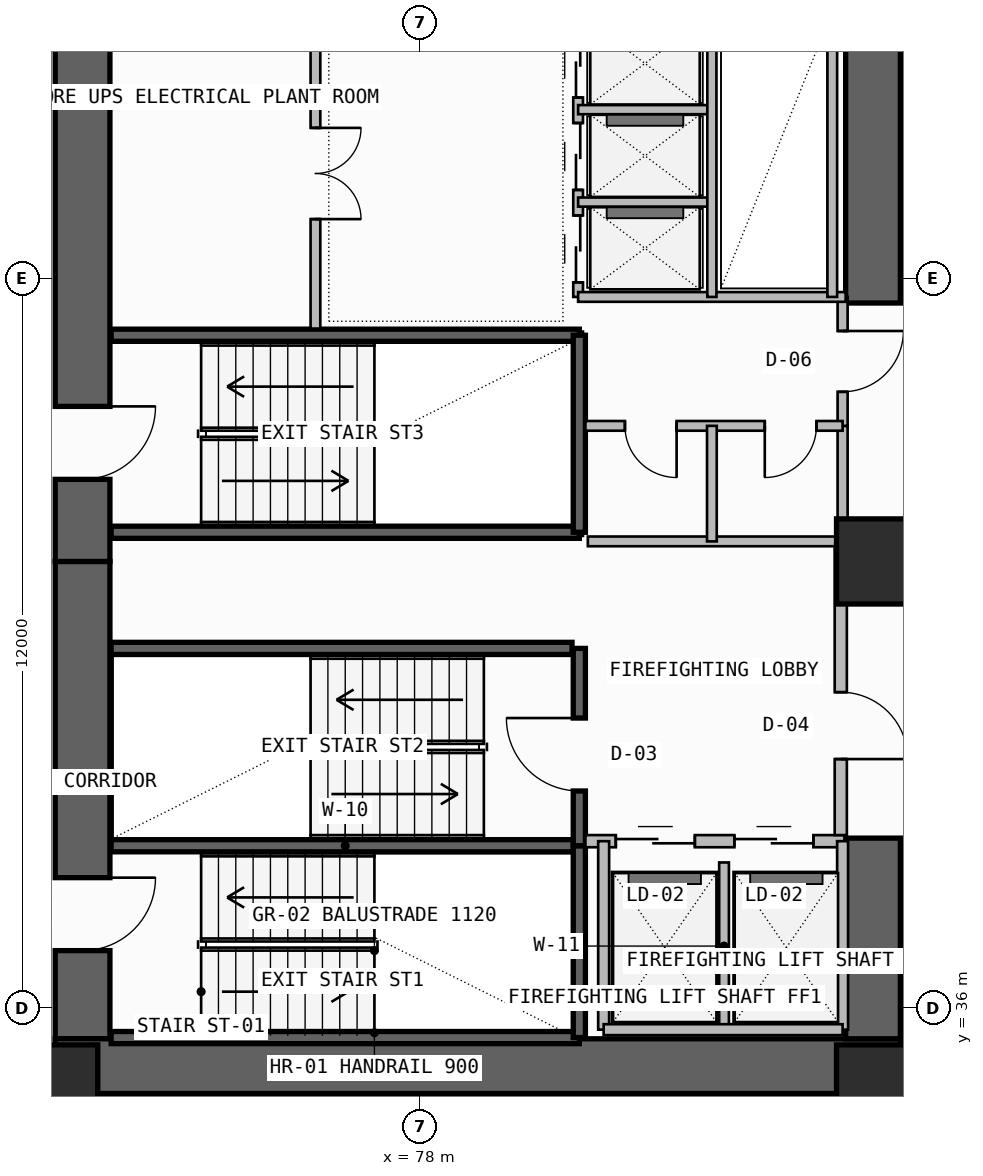
"""IFC4 building model, lengths in metres.
Left out: names, types, materials, properties, quantities, classifications, styles, units other than length and angle.
Written with IfcOpenShell. Run it as: python <this file> out.ifc"""

import sys

from ifc_helpers import new_model, si_unit, direction, frame, frame_2d, origin, origin_2d, place, context, subcontext, project, spatial, rectangle, extrude, element, fill, save


model = new_model("IFC4")
c1 = context("Model", 3, precision=1e-05, world=origin(), true_north=direction((0.0, 1.0)))
c2 = subcontext(c1, "Body", "Model", "MODEL_VIEW")
j1 = project(units=[si_unit("LENGTHUNIT", "METRE"), si_unit("PLANEANGLEUNIT", "RADIAN")], contexts=[c1])
p1 = place(None, origin())
s1 = spatial("IfcSite", under=j1, at=p1, CompositionType="ELEMENT")
p2 = place(p1, origin())
s2 = spatial("IfcBuilding", under=s1, at=p2, CompositionType="ELEMENT")
p3 = place(p2, frame((0.0, 0.0, 143.1)))
s3 = spatial("IfcBuildingStorey", under=s2, at=p3, CompositionType="ELEMENT", Elevation=143.1)
p4 = place(p3, frame((72.45, 35.5, -0.26), z_axis=(0.0, 0.0, 1.0), x_axis=(0.0, 1.0, 0.0)))
e1 = element("IfcWall", 1, at=p4, inside=s3, PredefinedType="SHEAR", context=c2, shape_type="SweptSolid", body=[
    extrude(rectangle(XDim=7.85, YDim=0.9, at=frame_2d((3.925, 0.0))), origin(), (0.0, 0.0, 1.0), 3.6),
])
p5 = place(p4, frame((1.45, 0.0, 0.26)))
e2 = element("IfcOpeningElement", 2, at=p5, cuts=e1, PredefinedType="OPENING", context=c2, shape_type="SweptSolid", body=[
    extrude(rectangle(XDim=1.2, YDim=2.2, at=frame_2d((0.6, 1.1))), frame((0.0, 0.46, 0.0), z_axis=(0.0, -1.0, 0.0), x_axis=(1.0, 0.0, 0.0)), (0.0, 0.0, 1.0), 0.92),
])
p6 = place(p3, frame((72.0, 35.05, -0.26), z_axis=(0.0, 0.0, 1.0), x_axis=(1.0, 0.0, 0.0)))
e3 = element("IfcWall", 3, at=p6, inside=s3, PredefinedType="SHEAR", context=c2, shape_type="SweptSolid", body=[
    extrude(rectangle(XDim=13.9, YDim=0.9, at=frame_2d((6.95, 0.0))), origin(), (0.0, 0.0, 1.0), 3.6),
])
p7 = place(p3, frame((85.45, 35.5, -0.26), z_axis=(0.0, 0.0, 1.0), x_axis=(0.0, 1.0, 0.0)))
e4 = element("IfcWall", 4, at=p7, inside=s3, PredefinedType="SHEAR", context=c2, shape_type="SweptSolid", body=[
    extrude(rectangle(XDim=3.3, YDim=0.9, at=frame_2d((1.65, 0.0))), origin(), (0.0, 0.0, 1.0), 3.6),
])
p8 = place(p3, frame((72.45, 43.35, -0.26), z_axis=(0.0, 0.0, 1.0), x_axis=(0.0, 1.0, 0.0)))
e5 = element("IfcWall", 5, at=p8, inside=s3, PredefinedType="SHEAR", context=c2, shape_type="SweptSolid", body=[
    extrude(rectangle(XDim=12.7, YDim=0.9, at=frame_2d((6.35, 0.0))), origin(), (0.0, 0.0, 1.0), 3.6),
])
p9 = place(p8, frame((1.35, 0.0, 0.26)))
e6 = element("IfcOpeningElement", 6, at=p9, cuts=e5, PredefinedType="OPENING", context=c2, shape_type="SweptSolid", body=[
    extrude(rectangle(XDim=1.2, YDim=2.2, at=frame_2d((0.6, 1.1))), frame((0.0, 0.46, 0.0), z_axis=(0.0, -1.0, 0.0), x_axis=(1.0, 0.0, 0.0)), (0.0, 0.0, 1.0), 0.92),
])
p10 = place(p3, frame((85.45, 47.6, -0.26), z_axis=(0.0, 0.0, 1.0), x_axis=(0.0, 1.0, 0.0)))
e7 = element("IfcWall", 7, at=p10, inside=s3, PredefinedType="SHEAR", context=c2, shape_type="SweptSolid", body=[
    extrude(rectangle(XDim=8.45, YDim=0.9, at=frame_2d((4.225, 0.0))), origin(), (0.0, 0.0, 1.0), 3.6),
])
for number, where, z_axis, x_axis in (
    (8, (72.0, 34.7, 0.0), (0.0, 0.0, 1.0), (1.0, 0.0, 0.0)),
    (9, (85.55, 34.7, 0.0), (0.0, 0.0, 1.0), (1.0, 0.0, 0.0)),
    (10, (85.55, 43.35, 0.0), (0.0, 0.0, 1.0), (1.0, 0.0, 0.0)),
):
    element("IfcColumn", number, at=place(p3, frame(where, z_axis=z_axis, x_axis=x_axis)), inside=s3, PredefinedType="COLUMN", context=c2, shape_type="SweptSolid", body=[
        extrude(rectangle(XDim=1.4, YDim=1.4, at=origin_2d()), origin(), (0.0, 0.0, 1.0), 3.6),
    ])
for number, where, z_axis, x_axis in (
    (11, (72.92, 35.52, -0.26), (0.0, 0.0, 1.0), (1.0, 0.0, 0.0)),
    (12, (72.92, 38.675, -0.26), (0.0, 0.0, 1.0), (1.0, 0.0, 0.0)),
):
    element("IfcWall", number, at=place(p3, frame(where, z_axis=z_axis, x_axis=x_axis)), inside=s3, PredefinedType="SOLIDWALL", context=c2, shape_type="SweptSolid", body=[
        extrude(rectangle(XDim=7.7, YDim=0.2, at=frame_2d((3.85, 0.0))), origin(), (0.0, 0.0, 1.0), 3.6),
    ])
p11 = place(p3, frame((80.62, 35.52, -0.26), z_axis=(0.0, 0.0, 1.0), x_axis=(0.0, 1.0, 0.0)))
e13 = element("IfcWall", 13, at=p11, inside=s3, PredefinedType="SOLIDWALL", context=c2, shape_type="SweptSolid", body=[
    extrude(rectangle(XDim=3.155, YDim=0.2, at=frame_2d((1.578, 0.0))), origin(), (0.0, 0.0, 1.0), 3.6),
])
p12 = place(p3, frame((80.62, 38.675, -0.26), z_axis=(0.0, 0.0, 1.0), x_axis=(0.0, 1.0, 0.0)))
e14 = element("IfcWall", 14, at=p12, inside=s3, PredefinedType="SOLIDWALL", context=c2, shape_type="SweptSolid", body=[
    extrude(rectangle(XDim=3.245, YDim=0.2, at=frame_2d((1.623, 0.0))), origin(), (0.0, 0.0, 1.0), 3.6),
])
p13 = place(p12, frame((0.9, 0.0, 0.26)))
e15 = element("IfcOpeningElement", 15, at=p13, cuts=e14, PredefinedType="OPENING", context=c2, shape_type="SweptSolid", body=[
    extrude(rectangle(XDim=1.2, YDim=2.2, at=frame_2d((0.6, 1.1))), frame((0.0, 0.11, 0.0), z_axis=(0.0, -1.0, 0.0), x_axis=(1.0, 0.0, 0.0)), (0.0, 0.0, 1.0), 0.22),
])
p14 = place(p3, frame((80.72, 38.75, 0.0), z_axis=(0.0, 0.0, 1.0), x_axis=(1.0, 0.0, 0.0)))
e16 = element("IfcWall", 16, at=p14, inside=s3, PredefinedType="SOLIDWALL", context=c2, shape_type="SweptSolid", body=[
    extrude(rectangle(XDim=4.26, YDim=0.2, at=frame_2d((2.13, 0.0))), origin(), (0.0, 0.0, 1.0), 3.34),
])
p15 = place(p14, frame((0.5, 0.0, 0.0)))
e17 = element("IfcOpeningElement", 17, at=p15, cuts=e16, PredefinedType="OPENING", context=c2, shape_type="SweptSolid", body=[
    extrude(rectangle(XDim=1.3, YDim=2.3, at=frame_2d((0.65, 1.15))), frame((0.0, 0.11, 0.0), z_axis=(0.0, -1.0, 0.0), x_axis=(1.0, 0.0, 0.0)), (0.0, 0.0, 1.0), 0.22),
])
p16 = place(p14, frame((2.45, 0.0, 0.0)))
e18 = element("IfcOpeningElement", 18, at=p16, cuts=e16, PredefinedType="OPENING", context=c2, shape_type="SweptSolid", body=[
    extrude(rectangle(XDim=1.3, YDim=2.3, at=frame_2d((0.65, 1.15))), frame((0.0, 0.11, 0.0), z_axis=(0.0, -1.0, 0.0), x_axis=(1.0, 0.0, 0.0)), (0.0, 0.0, 1.0), 0.22),
])
p17 = place(p3, frame((83.0, 35.65, 0.0), z_axis=(0.0, 0.0, 1.0), x_axis=(0.0, 1.0, 0.0)))
e19 = element("IfcWall", 19, at=p17, inside=s3, PredefinedType="PLUMBINGWALL", context=c2, shape_type="SweptSolid", body=[
    extrude(rectangle(XDim=2.75, YDim=0.16, at=frame_2d((1.375, 0.0))), origin(), (0.0, 0.0, 1.0), 3.34),
])
for number, where, z_axis, x_axis in (
    (20, (84.95, 35.65, 0.0), (0.0, 0.0, 1.0), (0.0, 1.0, 0.0)),
    (21, (81.02, 35.65, 0.0), (0.0, 0.0, 1.0), (0.0, 1.0, 0.0)),
):
    element("IfcWall", number, at=place(p3, frame(where, z_axis=z_axis, x_axis=x_axis)), inside=s3, PredefinedType="SOLIDWALL", context=c2, shape_type="SweptSolid", body=[
        extrude(rectangle(XDim=3.1, YDim=0.18, at=frame_2d((1.55, 0.0))), origin(), (0.0, 0.0, 1.0), 3.34),
    ])
p18 = place(p3, frame((81.02, 35.65, 0.0), z_axis=(0.0, 0.0, 1.0), x_axis=(1.0, 0.0, 0.0)))
e22 = element("IfcWall", 22, at=p18, inside=s3, PredefinedType="SOLIDWALL", context=c2, shape_type="SweptSolid", body=[
    extrude(rectangle(XDim=3.93, YDim=0.18, at=frame_2d((1.965, 0.0))), origin(), (0.0, 0.0, 1.0), 3.34),
])
p19 = place(p3, frame((84.92, 38.85, 0.0), z_axis=(0.0, 0.0, 1.0), x_axis=(0.0, 1.0, 0.0)))
e23 = element("IfcWall", 23, at=p19, inside=s3, PredefinedType="SOLIDWALL", context=c2, shape_type="SweptSolid", body=[
    extrude(rectangle(XDim=4.83, YDim=0.2, at=frame_2d((2.415, 0.0))), origin(), (0.0, 0.0, 1.0), 3.34),
])
p20 = place(p19, frame((1.25, 0.0, 0.0)))
e24 = element("IfcOpeningElement", 24, at=p20, cuts=e23, PredefinedType="OPENING", context=c2, shape_type="SweptSolid", body=[
    extrude(rectangle(XDim=1.1, YDim=2.2, at=frame_2d((0.55, 1.1))), frame((0.0, 0.11, 0.0), z_axis=(0.0, -1.0, 0.0), x_axis=(1.0, 0.0, 0.0)), (0.0, 0.0, 1.0), 0.22),
])
p21 = place(p3, frame((72.92, 41.92, -0.26), z_axis=(0.0, 0.0, 1.0), x_axis=(1.0, 0.0, 0.0)))
e25 = element("IfcWall", 25, at=p21, inside=s3, PredefinedType="SOLIDWALL", context=c2, shape_type="SweptSolid", body=[
    extrude(rectangle(XDim=7.58, YDim=0.2, at=frame_2d((3.79, 0.0))), origin(), (0.0, 0.0, 1.0), 3.6),
])
for number, where, z_axis, x_axis in (
    (26, (72.92, 43.83, -0.26), (0.0, 0.0, 1.0), (1.0, 0.0, 0.0)),
    (27, (72.92, 47.07, -0.26), (0.0, 0.0, 1.0), (1.0, 0.0, 0.0)),
):
    element("IfcWall", number, at=place(p3, frame(where, z_axis=z_axis, x_axis=x_axis)), inside=s3, PredefinedType="SOLIDWALL", context=c2, shape_type="SweptSolid", body=[
        extrude(rectangle(XDim=7.7, YDim=0.2, at=frame_2d((3.85, 0.0))), origin(), (0.0, 0.0, 1.0), 3.6),
    ])
p22 = place(p3, frame((80.62, 43.83, -0.26), z_axis=(0.0, 0.0, 1.0), x_axis=(0.0, 1.0, 0.0)))
e28 = element("IfcWall", 28, at=p22, inside=s3, PredefinedType="SOLIDWALL", context=c2, shape_type="SweptSolid", body=[
    extrude(rectangle(XDim=3.24, YDim=0.2, at=frame_2d((1.62, 0.0))), origin(), (0.0, 0.0, 1.0), 3.6),
])
p23 = place(p3, frame((84.95, 43.68, 0.0), z_axis=(0.0, 0.0, 1.0), x_axis=(0.0, 1.0, 0.0)))
e29 = element("IfcWall", 29, at=p23, inside=s3, PredefinedType="PLUMBINGWALL", context=c2, shape_type="SweptSolid", body=[
    extrude(rectangle(XDim=1.9, YDim=0.165, at=frame_2d((0.95, 0.0))), origin(), (0.0, 0.0, 1.0), 3.34),
])
p24 = place(p3, frame((84.95, 45.58, 0.0), z_axis=(0.0, 0.0, 1.0), x_axis=(0.0, 1.0, 0.0)))
e30 = element("IfcWall", 30, at=p24, inside=s3, PredefinedType="PARTITIONING", context=c2, shape_type="SweptSolid", body=[
    extrude(rectangle(XDim=2.12, YDim=0.165, at=frame_2d((1.06, 0.0))), origin(), (0.0, 0.0, 1.0), 3.34),
])
p25 = place(p24, frame((0.56, 0.0, 0.0)))
e31 = element("IfcOpeningElement", 31, at=p25, cuts=e30, PredefinedType="OPENING", context=c2, shape_type="SweptSolid", body=[
    extrude(rectangle(XDim=1.0, YDim=2.2, at=frame_2d((0.5, 1.1))), frame((0.0, 0.093, 0.0), z_axis=(0.0, -1.0, 0.0), x_axis=(1.0, 0.0, 0.0)), (0.0, 0.0, 1.0), 0.185),
])
p26 = place(p3, frame((80.72, 45.58, 0.0), z_axis=(0.0, 0.0, 1.0), x_axis=(1.0, 0.0, 0.0)))
e32 = element("IfcWall", 32, at=p26, inside=s3, PredefinedType="PLUMBINGWALL", context=c2, shape_type="SweptSolid", body=[
    extrude(rectangle(XDim=4.23, YDim=0.16, at=frame_2d((2.115, 0.0))), origin(), (0.0, 0.0, 1.0), 3.34),
])
p27 = place(p26, frame((0.65, 0.0, 0.0)))
e33 = element("IfcOpeningElement", 33, at=p27, cuts=e32, PredefinedType="OPENING", context=c2, shape_type="SweptSolid", body=[
    extrude(rectangle(XDim=0.85, YDim=2.05, at=frame_2d((0.425, 1.025))), frame((0.0, 0.09, 0.0), z_axis=(0.0, -1.0, 0.0), x_axis=(1.0, 0.0, 0.0)), (0.0, 0.0, 1.0), 0.18),
])
p28 = place(p26, frame((2.95, 0.0, 0.0)))
e34 = element("IfcOpeningElement", 34, at=p28, cuts=e32, PredefinedType="OPENING", context=c2, shape_type="SweptSolid", body=[
    extrude(rectangle(XDim=0.85, YDim=2.05, at=frame_2d((0.425, 1.025))), frame((0.0, 0.09, 0.0), z_axis=(0.0, -1.0, 0.0), x_axis=(1.0, 0.0, 0.0)), (0.0, 0.0, 1.0), 0.18),
])
p29 = place(p3, frame((80.76, 43.68, 0.0), z_axis=(0.0, 0.0, 1.0), x_axis=(1.0, 0.0, 0.0)))
e35 = element("IfcWall", 35, at=p29, inside=s3, PredefinedType="PLUMBINGWALL", context=c2, shape_type="SweptSolid", body=[
    extrude(rectangle(XDim=4.19, YDim=0.16, at=frame_2d((2.095, 0.0))), origin(), (0.0, 0.0, 1.0), 3.34),
])
p30 = place(p3, frame((82.8, 43.68, 0.0), z_axis=(0.0, 0.0, 1.0), x_axis=(0.0, 1.0, 0.0)))
e36 = element("IfcWall", 36, at=p30, inside=s3, PredefinedType="PLUMBINGWALL", context=c2, shape_type="SweptSolid", body=[
    extrude(rectangle(XDim=1.9, YDim=0.16, at=frame_2d((0.95, 0.0))), origin(), (0.0, 0.0, 1.0), 3.34),
])
p31 = place(p3, frame((76.28, 47.18, 0.0), z_axis=(0.0, 0.0, 1.0), x_axis=(0.0, 1.0, 0.0)))
e37 = element("IfcWall", 37, at=p31, inside=s3, PredefinedType="SOLIDWALL", context=c2, shape_type="SweptSolid", body=[
    extrude(rectangle(XDim=5.14, YDim=0.16, at=frame_2d((2.57, 0.0))), origin(), (0.0, 0.0, 1.0), 3.34),
])
p32 = place(p31, frame((1.8, 0.0, 0.0)))
e38 = element("IfcOpeningElement", 38, at=p32, cuts=e37, PredefinedType="OPENING", context=c2, shape_type="SweptSolid", body=[
    extrude(rectangle(XDim=1.5, YDim=2.25, at=frame_2d((0.75, 1.125))), frame((0.0, 0.09, 0.0), z_axis=(0.0, -1.0, 0.0), x_axis=(1.0, 0.0, 0.0)), (0.0, 0.0, 1.0), 0.18),
])
p33 = place(p3, frame((80.6, 47.7, 0.0), z_axis=(0.0, 0.0, 1.0), x_axis=(0.0, 1.0, 0.0)))
e39 = element("IfcWall", 39, at=p33, inside=s3, PredefinedType="SOLIDWALL", context=c2, shape_type="SweptSolid", body=[
    extrude(rectangle(XDim=4.6, YDim=0.16, at=frame_2d((2.3, 0.0))), origin(), (0.0, 0.0, 1.0), 3.34),
])
p34 = place(p33, frame((0.24, 0.0, 0.0)))
e40 = element("IfcOpeningElement", 40, at=p34, cuts=e39, PredefinedType="OPENING", context=c2, shape_type="SweptSolid", body=[
    extrude(rectangle(XDim=1.1, YDim=2.25, at=frame_2d((0.55, 1.125))), frame((0.0, 0.09, 0.0), z_axis=(0.0, -1.0, 0.0), x_axis=(1.0, 0.0, 0.0)), (0.0, 0.0, 1.0), 0.18),
])
p35 = place(p33, frame((1.76, 0.0, 0.0)))
e41 = element("IfcOpeningElement", 41, at=p35, cuts=e39, PredefinedType="OPENING", context=c2, shape_type="SweptSolid", body=[
    extrude(rectangle(XDim=1.1, YDim=2.25, at=frame_2d((0.55, 1.125))), frame((0.0, 0.09, 0.0), z_axis=(0.0, -1.0, 0.0), x_axis=(1.0, 0.0, 0.0)), (0.0, 0.0, 1.0), 0.18),
])
p36 = place(p33, frame((3.28, 0.0, 0.0)))
e42 = element("IfcOpeningElement", 42, at=p36, cuts=e39, PredefinedType="OPENING", context=c2, shape_type="SweptSolid", body=[
    extrude(rectangle(XDim=1.1, YDim=2.25, at=frame_2d((0.55, 1.125))), frame((0.0, 0.09, 0.0), z_axis=(0.0, -1.0, 0.0), x_axis=(1.0, 0.0, 0.0)), (0.0, 0.0, 1.0), 0.18),
])
p37 = place(p3, frame((80.6, 47.7, 0.0), z_axis=(0.0, 0.0, 1.0), x_axis=(1.0, 0.0, 0.0)))
e43 = element("IfcWall", 43, at=p37, inside=s3, PredefinedType="SOLIDWALL", context=c2, shape_type="SweptSolid", body=[
    extrude(rectangle(XDim=4.4, YDim=0.16, at=frame_2d((2.2, 0.0))), origin(), (0.0, 0.0, 1.0), 3.34),
])
for number, where, z_axis, x_axis in (
    (44, (80.6, 49.26, 0.0), (0.0, 0.0, 1.0), (1.0, 0.0, 0.0)),
    (45, (80.6, 50.78, 0.0), (0.0, 0.0, 1.0), (1.0, 0.0, 0.0)),
):
    element("IfcWall", number, at=place(p3, frame(where, z_axis=z_axis, x_axis=x_axis)), inside=s3, PredefinedType="PLUMBINGWALL", context=c2, shape_type="SweptSolid", body=[
        extrude(rectangle(XDim=2.2, YDim=0.15, at=frame_2d((1.1, 0.0))), origin(), (0.0, 0.0, 1.0), 3.34),
    ])
p38 = place(p3, frame((82.8, 47.7, 0.0), z_axis=(0.0, 0.0, 1.0), x_axis=(0.0, 1.0, 0.0)))
e46 = element("IfcWall", 46, at=p38, inside=s3, PredefinedType="PLUMBINGWALL", context=c2, shape_type="SweptSolid", body=[
    extrude(rectangle(XDim=4.6, YDim=0.15, at=frame_2d((2.3, 0.0))), origin(), (0.0, 0.0, 1.0), 3.34),
])
p39 = place(p3, frame((84.78, 47.7, 0.0), z_axis=(0.0, 0.0, 1.0), x_axis=(0.0, 1.0, 0.0)))
e47 = element("IfcWall", 47, at=p39, inside=s3, PredefinedType="SOLIDWALL", context=c2, shape_type="SweptSolid", body=[
    extrude(rectangle(XDim=4.6, YDim=0.16, at=frame_2d((2.3, 0.0))), origin(), (0.0, 0.0, 1.0), 3.34),
])
p40 = place(p5, frame((1.2, 0.0, 0.0), z_axis=(0.0, 0.0, 1.0), x_axis=(-1.0, 0.0, 0.0)))
e48 = element("IfcDoor", 48, at=p40, inside=s3, OperationType="SINGLE_SWING_LEFT", PredefinedType="USERDEFINED", context=c2, shape_type="SweptSolid", body=[
    extrude(rectangle(XDim=1.2, YDim=2.2, at=frame_2d((0.6, 1.1))), frame((0.0, 0.025, 0.0), z_axis=(0.0, -1.0, 0.0), x_axis=(1.0, 0.0, 0.0)), (0.0, 0.0, 1.0), 0.05),
])
fill(e2, e48)
p41 = place(p13, origin())
e49 = element("IfcDoor", 49, at=p41, inside=s3, OperationType="SINGLE_SWING_RIGHT", PredefinedType="USERDEFINED", context=c2, shape_type="SweptSolid", body=[
    extrude(rectangle(XDim=1.2, YDim=2.2, at=frame_2d((0.6, 1.1))), frame((0.0, 0.025, 0.0), z_axis=(0.0, -1.0, 0.0), x_axis=(1.0, 0.0, 0.0)), (0.0, 0.0, 1.0), 0.05),
])
fill(e15, e49)
p42 = place(p15, origin())
e50 = element("IfcDoor", 50, at=p42, inside=s3, OperationType="DOUBLE_DOOR_SLIDING", PredefinedType="DOOR", context=c2, shape_type="SweptSolid", body=[
    extrude(rectangle(XDim=1.3, YDim=2.3, at=frame_2d((0.65, 1.15))), frame((0.0, 0.025, 0.0), z_axis=(0.0, -1.0, 0.0), x_axis=(1.0, 0.0, 0.0)), (0.0, 0.0, 1.0), 0.05),
])
fill(e17, e50)
p43 = place(p16, origin())
e51 = element("IfcDoor", 51, at=p43, inside=s3, OperationType="DOUBLE_DOOR_SLIDING", PredefinedType="DOOR", context=c2, shape_type="SweptSolid", body=[
    extrude(rectangle(XDim=1.3, YDim=2.3, at=frame_2d((0.65, 1.15))), frame((0.0, 0.025, 0.0), z_axis=(0.0, -1.0, 0.0), x_axis=(1.0, 0.0, 0.0)), (0.0, 0.0, 1.0), 0.05),
])
fill(e18, e51)
p44 = place(p20, frame((1.1, 0.0, 0.0), z_axis=(0.0, 0.0, 1.0), x_axis=(-1.0, 0.0, 0.0)))
e52 = element("IfcDoor", 52, at=p44, inside=s3, OperationType="SINGLE_SWING_RIGHT", PredefinedType="DOOR", context=c2, shape_type="SweptSolid", body=[
    extrude(rectangle(XDim=1.1, YDim=2.2, at=frame_2d((0.55, 1.1))), frame((0.0, 0.025, 0.0), z_axis=(0.0, -1.0, 0.0), x_axis=(1.0, 0.0, 0.0)), (0.0, 0.0, 1.0), 0.05),
])
fill(e24, e52)
p45 = place(p9, frame((1.2, 0.0, 0.0), z_axis=(0.0, 0.0, 1.0), x_axis=(-1.0, 0.0, 0.0)))
e53 = element("IfcDoor", 53, at=p45, inside=s3, OperationType="SINGLE_SWING_LEFT", PredefinedType="USERDEFINED", context=c2, shape_type="SweptSolid", body=[
    extrude(rectangle(XDim=1.2, YDim=2.2, at=frame_2d((0.6, 1.1))), frame((0.0, 0.025, 0.0), z_axis=(0.0, -1.0, 0.0), x_axis=(1.0, 0.0, 0.0)), (0.0, 0.0, 1.0), 0.05),
])
fill(e6, e53)
p46 = place(p25, frame((1.0, 0.0, 0.0), z_axis=(0.0, 0.0, 1.0), x_axis=(-1.0, 0.0, 0.0)))
e54 = element("IfcDoor", 54, at=p46, inside=s3, OperationType="SINGLE_SWING_LEFT", PredefinedType="DOOR", context=c2, shape_type="SweptSolid", body=[
    extrude(rectangle(XDim=1.0, YDim=2.2, at=frame_2d((0.5, 1.1))), frame((0.0, 0.025, 0.0), z_axis=(0.0, -1.0, 0.0), x_axis=(1.0, 0.0, 0.0)), (0.0, 0.0, 1.0), 0.05),
])
fill(e31, e54)
p47 = place(p27, frame((0.85, 0.0, 0.0), z_axis=(0.0, 0.0, 1.0), x_axis=(-1.0, 0.0, 0.0)))
e55 = element("IfcDoor", 55, at=p47, inside=s3, OperationType="SINGLE_SWING_LEFT", PredefinedType="DOOR", context=c2, shape_type="SweptSolid", body=[
    extrude(rectangle(XDim=0.85, YDim=2.05, at=frame_2d((0.425, 1.025))), frame((0.0, 0.025, 0.0), z_axis=(0.0, -1.0, 0.0), x_axis=(1.0, 0.0, 0.0)), (0.0, 0.0, 1.0), 0.05),
])
fill(e33, e55)
p48 = place(p28, frame((0.85, 0.0, 0.0), z_axis=(0.0, 0.0, 1.0), x_axis=(-1.0, 0.0, 0.0)))
e56 = element("IfcDoor", 56, at=p48, inside=s3, OperationType="SINGLE_SWING_RIGHT", PredefinedType="DOOR", context=c2, shape_type="SweptSolid", body=[
    extrude(rectangle(XDim=0.85, YDim=2.05, at=frame_2d((0.425, 1.025))), frame((0.0, 0.025, 0.0), z_axis=(0.0, -1.0, 0.0), x_axis=(1.0, 0.0, 0.0)), (0.0, 0.0, 1.0), 0.05),
])
fill(e34, e56)
p49 = place(p32, frame((1.5, 0.0, 0.0), z_axis=(0.0, 0.0, 1.0), x_axis=(-1.0, 0.0, 0.0)))
e57 = element("IfcDoor", 57, at=p49, inside=s3, OperationType="DOUBLE_DOOR_SINGLE_SWING", PredefinedType="DOOR", context=c2, shape_type="SweptSolid", body=[
    extrude(rectangle(XDim=1.5, YDim=2.25, at=frame_2d((0.75, 1.125))), frame((0.0, 0.025, 0.0), z_axis=(0.0, -1.0, 0.0), x_axis=(1.0, 0.0, 0.0)), (0.0, 0.0, 1.0), 0.05),
])
fill(e38, e57)
p50 = place(p34, frame((1.1, 0.0, 0.0), z_axis=(0.0, 0.0, 1.0), x_axis=(-1.0, 0.0, 0.0)))
e58 = element("IfcDoor", 58, at=p50, inside=s3, OperationType="DOUBLE_DOOR_SLIDING", PredefinedType="DOOR", context=c2, shape_type="SweptSolid", body=[
    extrude(rectangle(XDim=1.1, YDim=2.25, at=frame_2d((0.55, 1.125))), frame((0.0, 0.025, 0.0), z_axis=(0.0, -1.0, 0.0), x_axis=(1.0, 0.0, 0.0)), (0.0, 0.0, 1.0), 0.05),
])
fill(e40, e58)
p51 = place(p35, frame((1.1, 0.0, 0.0), z_axis=(0.0, 0.0, 1.0), x_axis=(-1.0, 0.0, 0.0)))
e59 = element("IfcDoor", 59, at=p51, inside=s3, OperationType="DOUBLE_DOOR_SLIDING", PredefinedType="DOOR", context=c2, shape_type="SweptSolid", body=[
    extrude(rectangle(XDim=1.1, YDim=2.25, at=frame_2d((0.55, 1.125))), frame((0.0, 0.025, 0.0), z_axis=(0.0, -1.0, 0.0), x_axis=(1.0, 0.0, 0.0)), (0.0, 0.0, 1.0), 0.05),
])
fill(e41, e59)
p52 = place(p36, frame((1.1, 0.0, 0.0), z_axis=(0.0, 0.0, 1.0), x_axis=(-1.0, 0.0, 0.0)))
e60 = element("IfcDoor", 60, at=p52, inside=s3, OperationType="DOUBLE_DOOR_SLIDING", PredefinedType="DOOR", context=c2, shape_type="SweptSolid", body=[
    extrude(rectangle(XDim=1.1, YDim=2.25, at=frame_2d((0.55, 1.125))), frame((0.0, 0.025, 0.0), z_axis=(0.0, -1.0, 0.0), x_axis=(1.0, 0.0, 0.0)), (0.0, 0.0, 1.0), 0.05),
])
fill(e42, e60)
save(model, sys.argv[1])
